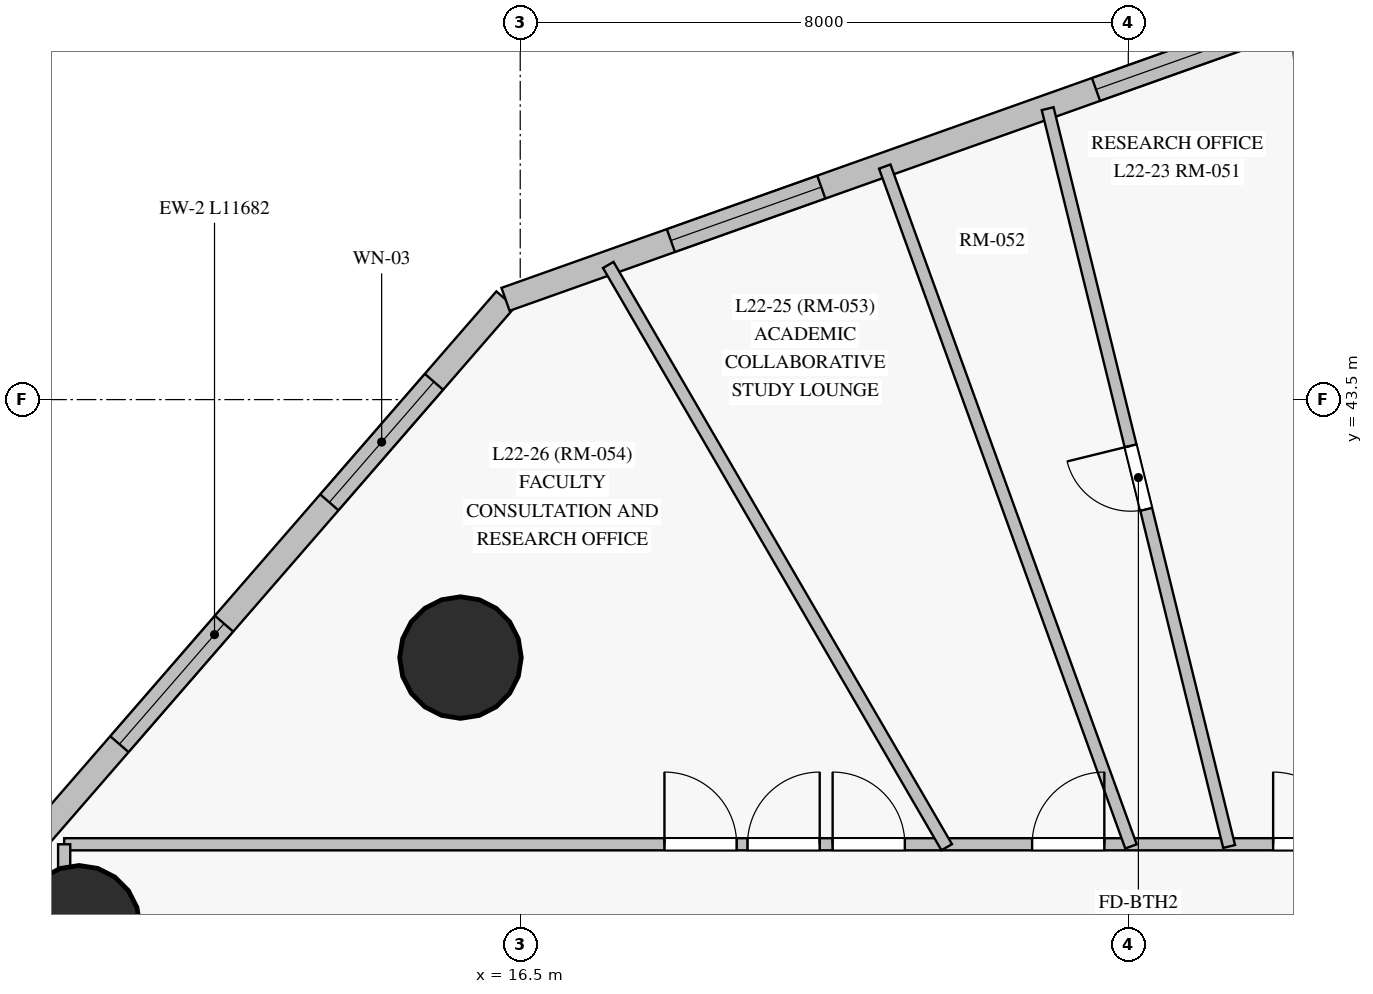
"""IFC4 building model, lengths in metres.
Left out: names, types, materials, properties, quantities, classifications, styles, units other than length and angle.
Written with IfcOpenShell. Run it as: python <this file> out.ifc"""

import sys

from ifc_helpers import new_model, si_unit, direction, frame, frame_2d, origin, origin_with_axes, origin_2d, place, context, subcontext, project, spatial, rectangle, circle, extrude, source, transform, mapped, element, fill, save


model = new_model("IFC4")
c1 = context("Model", 3, precision=1e-05, world=origin(), true_north=direction((0.0, 1.0)))
c2 = subcontext(c1, "Body", "Model", "MODEL_VIEW")
j1 = project(units=[si_unit("LENGTHUNIT", "METRE"), si_unit("PLANEANGLEUNIT", "RADIAN")], contexts=[c1])
p1 = place(None, origin())
s1 = spatial("IfcSite", under=j1, at=p1, CompositionType="ELEMENT")
p2 = place(p1, origin())
s2 = spatial("IfcBuilding", under=s1, at=p2, CompositionType="ELEMENT")
p3 = place(p2, frame((0.0, 0.0, 84.1)))
s3 = spatial("IfcBuildingStorey", under=s2, at=p3, CompositionType="ELEMENT", Elevation=84.1)
m1 = source(origin_with_axes(), c2, "Body", "SweptSolid", [
    extrude(circle(Radius=0.8, at=origin_2d()), origin(), (0.0, 0.0, 1.0), 3.6),
])
for number, where, z_axis, x_axis in (
    (1, (15.714, 40.106, 0.0), (0.0, 0.0, 1.0), (1.0, 0.0, 0.0)),
    (2, (10.697, 36.571, 0.0), (0.0, 0.0, 1.0), (1.0, 0.0, 0.0)),
):
    element("IfcColumn", number, at=place(p3, frame(where, z_axis=z_axis, x_axis=x_axis)), inside=s3, PredefinedType="COLUMN", context=c2, shape_type="MappedRepresentation", body=[
        mapped(m1, transform((0.0, 0.0, 0.0), scale=1.0)),
    ])
p4 = place(p3, frame((16.307, 44.819, 0.0), z_axis=(0.0, 0.0, 1.0), x_axis=(-0.655537404489, -0.755162705194, 0.0)))
e3 = element("IfcWall", 3, at=p4, inside=s3, PredefinedType="SOLIDWALL", context=c2, shape_type="SweptSolid", body=[
    extrude(rectangle(XDim=11.682, YDim=0.32, at=frame_2d((5.841, 0.0))), origin(), (0.0, 0.0, 1.0), 3.325),
])
p5 = place(p4, frame((1.437, 0.0, 0.85)))
e4 = element("IfcOpeningElement", 4, at=p5, cuts=e3, PredefinedType="OPENING", context=c2, shape_type="SweptSolid", body=[
    extrude(rectangle(XDim=2.1, YDim=1.95, at=frame_2d((1.05, 0.975))), frame((0.0, 0.17, 0.0), z_axis=(0.0, -1.0, 0.0), x_axis=(1.0, 0.0, 0.0)), (0.0, 0.0, 1.0), 0.34),
])
p6 = place(p4, frame((5.65, 0.0, 0.85)))
e5 = element("IfcOpeningElement", 5, at=p6, cuts=e3, PredefinedType="OPENING", context=c2, shape_type="SweptSolid", body=[
    extrude(rectangle(XDim=2.1, YDim=1.95, at=frame_2d((1.05, 0.975))), frame((0.0, 0.17, 0.0), z_axis=(0.0, -1.0, 0.0), x_axis=(1.0, 0.0, 0.0)), (0.0, 0.0, 1.0), 0.34),
])
p7 = place(p3, frame((30.027, 49.696, 0.0), z_axis=(0.0, 0.0, 1.0), x_axis=(-0.942240443112, -0.334937228991, 0.0)))
e6 = element("IfcWall", 6, at=p7, inside=s3, PredefinedType="SOLIDWALL", context=c2, shape_type="SweptSolid", body=[
    extrude(rectangle(XDim=14.562, YDim=0.32, at=frame_2d((7.281, 0.0))), origin(), (0.0, 0.0, 1.0), 3.325),
])
p8 = place(p7, frame((0.745, 0.0, 0.85)))
e7 = element("IfcOpeningElement", 7, at=p8, cuts=e6, PredefinedType="OPENING", context=c2, shape_type="SweptSolid", body=[
    extrude(rectangle(XDim=2.1, YDim=1.95, at=frame_2d((1.05, 0.975))), frame((0.0, 0.17, 0.0), z_axis=(0.0, -1.0, 0.0), x_axis=(1.0, 0.0, 0.0)), (0.0, 0.0, 1.0), 0.34),
])
p9 = place(p7, frame((4.217, 0.0, 0.85)))
e8 = element("IfcOpeningElement", 8, at=p9, cuts=e6, PredefinedType="OPENING", context=c2, shape_type="SweptSolid", body=[
    extrude(rectangle(XDim=2.1, YDim=1.95, at=frame_2d((1.05, 0.975))), frame((0.0, 0.17, 0.0), z_axis=(0.0, -1.0, 0.0), x_axis=(1.0, 0.0, 0.0)), (0.0, 0.0, 1.0), 0.34),
])
p10 = place(p7, frame((10.153, 0.0, 0.85)))
e9 = element("IfcOpeningElement", 9, at=p10, cuts=e6, PredefinedType="OPENING", context=c2, shape_type="SweptSolid", body=[
    extrude(rectangle(XDim=2.1, YDim=1.95, at=frame_2d((1.05, 0.975))), frame((0.0, 0.17, 0.0), z_axis=(0.0, -1.0, 0.0), x_axis=(1.0, 0.0, 0.0)), (0.0, 0.0, 1.0), 0.34),
])
p11 = place(p3, frame((10.5, 37.65, 0.0), z_axis=(0.0, 0.0, 1.0), x_axis=(1.0, 0.0, 0.0)))
e10 = element("IfcWall", 10, at=p11, inside=s3, PredefinedType="PARTITIONING", context=c2, shape_type="SweptSolid", body=[
    extrude(rectangle(XDim=29.75, YDim=0.16, at=frame_2d((14.875, 0.0))), origin(), (0.0, 0.0, 1.0), 2.725),
])
p12 = place(p11, frame((27.918, 0.0, 0.0)))
e11 = element("IfcOpeningElement", 11, at=p12, cuts=e10, PredefinedType="OPENING", context=c2, shape_type="SweptSolid", body=[
    extrude(rectangle(XDim=0.95, YDim=2.15, at=frame_2d((0.475, 1.075))), frame((0.0, 0.09, 0.0), z_axis=(0.0, -1.0, 0.0), x_axis=(1.0, 0.0, 0.0)), (0.0, 0.0, 1.0), 0.18),
])
p13 = place(p11, frame((25.129, 0.0, 0.0)))
e12 = element("IfcOpeningElement", 12, at=p13, cuts=e10, PredefinedType="OPENING", context=c2, shape_type="SweptSolid", body=[
    extrude(rectangle(XDim=0.95, YDim=2.15, at=frame_2d((0.475, 1.075))), frame((0.0, 0.09, 0.0), z_axis=(0.0, -1.0, 0.0), x_axis=(1.0, 0.0, 0.0)), (0.0, 0.0, 1.0), 0.18),
])
p14 = place(p11, frame((21.748, 0.0, 0.0)))
e13 = element("IfcOpeningElement", 13, at=p14, cuts=e10, PredefinedType="OPENING", context=c2, shape_type="SweptSolid", body=[
    extrude(rectangle(XDim=0.86, YDim=2.1, at=frame_2d((0.43, 1.05))), frame((0.0, 0.09, 0.0), z_axis=(0.0, -1.0, 0.0), x_axis=(1.0, 0.0, 0.0)), (0.0, 0.0, 1.0), 0.18),
])
p15 = place(p11, frame((20.048, 0.0, 0.0)))
e14 = element("IfcOpeningElement", 14, at=p15, cuts=e10, PredefinedType="OPENING", context=c2, shape_type="SweptSolid", body=[
    extrude(rectangle(XDim=0.95, YDim=2.15, at=frame_2d((0.475, 1.075))), frame((0.0, 0.09, 0.0), z_axis=(0.0, -1.0, 0.0), x_axis=(1.0, 0.0, 0.0)), (0.0, 0.0, 1.0), 0.18),
])
p16 = place(p11, frame((17.722, 0.0, 0.0)))
e15 = element("IfcOpeningElement", 15, at=p16, cuts=e10, PredefinedType="OPENING", context=c2, shape_type="SweptSolid", body=[
    extrude(rectangle(XDim=0.95, YDim=2.15, at=frame_2d((0.475, 1.075))), frame((0.0, 0.09, 0.0), z_axis=(0.0, -1.0, 0.0), x_axis=(1.0, 0.0, 0.0)), (0.0, 0.0, 1.0), 0.18),
])
p17 = place(p11, frame((15.906, 0.0, 0.0)))
e16 = element("IfcOpeningElement", 16, at=p17, cuts=e10, PredefinedType="OPENING", context=c2, shape_type="SweptSolid", body=[
    extrude(rectangle(XDim=0.95, YDim=2.15, at=frame_2d((0.475, 1.075))), frame((0.0, 0.09, 0.0), z_axis=(0.0, -1.0, 0.0), x_axis=(1.0, 0.0, 0.0)), (0.0, 0.0, 1.0), 0.18),
])
p18 = place(p11, frame((12.735, 0.0, 0.0)))
e17 = element("IfcOpeningElement", 17, at=p18, cuts=e10, PredefinedType="OPENING", context=c2, shape_type="SweptSolid", body=[
    extrude(rectangle(XDim=0.95, YDim=2.15, at=frame_2d((0.475, 1.075))), frame((0.0, 0.09, 0.0), z_axis=(0.0, -1.0, 0.0), x_axis=(1.0, 0.0, 0.0)), (0.0, 0.0, 1.0), 0.18),
])
p19 = place(p11, frame((10.11, 0.0, 0.0)))
e18 = element("IfcOpeningElement", 18, at=p19, cuts=e10, PredefinedType="OPENING", context=c2, shape_type="SweptSolid", body=[
    extrude(rectangle(XDim=0.95, YDim=2.15, at=frame_2d((0.475, 1.075))), frame((0.0, 0.09, 0.0), z_axis=(0.0, -1.0, 0.0), x_axis=(1.0, 0.0, 0.0)), (0.0, 0.0, 1.0), 0.18),
])
p20 = place(p11, frame((8.99, 0.0, 0.0)))
e19 = element("IfcOpeningElement", 19, at=p20, cuts=e10, PredefinedType="OPENING", context=c2, shape_type="SweptSolid", body=[
    extrude(rectangle(XDim=0.95, YDim=2.15, at=frame_2d((0.475, 1.075))), frame((0.0, 0.09, 0.0), z_axis=(0.0, -1.0, 0.0), x_axis=(1.0, 0.0, 0.0)), (0.0, 0.0, 1.0), 0.18),
])
p21 = place(p11, frame((7.897, 0.0, 0.0)))
e20 = element("IfcOpeningElement", 20, at=p21, cuts=e10, PredefinedType="OPENING", context=c2, shape_type="SweptSolid", body=[
    extrude(rectangle(XDim=0.95, YDim=2.15, at=frame_2d((0.475, 1.075))), frame((0.0, 0.09, 0.0), z_axis=(0.0, -1.0, 0.0), x_axis=(1.0, 0.0, 0.0)), (0.0, 0.0, 1.0), 0.18),
])
p22 = place(p3, frame((10.5, 15.35, 0.0), z_axis=(0.0, 0.0, 1.0), x_axis=(0.0, 1.0, 0.0)))
e21 = element("IfcWall", 21, at=p22, inside=s3, PredefinedType="PARTITIONING", context=c2, shape_type="SweptSolid", body=[
    extrude(rectangle(XDim=22.3, YDim=0.16, at=frame_2d((11.15, 0.0))), origin(), (0.0, 0.0, 1.0), 2.725),
])
p23 = place(p22, frame((7.33, 0.0, 0.0)))
e22 = element("IfcOpeningElement", 22, at=p23, cuts=e21, PredefinedType="OPENING", context=c2, shape_type="SweptSolid", body=[
    extrude(rectangle(XDim=0.95, YDim=2.15, at=frame_2d((0.475, 1.075))), frame((0.0, 0.09, 0.0), z_axis=(0.0, -1.0, 0.0), x_axis=(1.0, 0.0, 0.0)), (0.0, 0.0, 1.0), 0.18),
])
p24 = place(p22, frame((11.015, 0.0, 0.0)))
e23 = element("IfcOpeningElement", 23, at=p24, cuts=e21, PredefinedType="OPENING", context=c2, shape_type="SweptSolid", body=[
    extrude(rectangle(XDim=0.95, YDim=2.15, at=frame_2d((0.475, 1.075))), frame((0.0, 0.09, 0.0), z_axis=(0.0, -1.0, 0.0), x_axis=(1.0, 0.0, 0.0)), (0.0, 0.0, 1.0), 0.18),
])
p25 = place(p3, frame((25.826, 37.621, 0.0), z_axis=(0.0, 0.0, 1.0), x_axis=(-0.238844378247, 0.971057857689, 0.0)))
e24 = element("IfcWall", 24, at=p25, inside=s3, PredefinedType="PARTITIONING", context=c2, shape_type="SweptSolid", body=[
    extrude(rectangle(XDim=9.996, YDim=0.16, at=frame_2d((4.998, 0.0))), origin(), (0.0, 0.0, 1.0), 3.325),
])
p26 = place(p25, frame((4.568, 0.0, 0.0)))
e25 = element("IfcOpeningElement", 25, at=p26, cuts=e24, PredefinedType="OPENING", context=c2, shape_type="SweptSolid", body=[
    extrude(rectangle(XDim=0.86, YDim=2.04, at=frame_2d((0.43, 1.02))), frame((0.0, 0.09, 0.0), z_axis=(0.0, -1.0, 0.0), x_axis=(1.0, 0.0, 0.0)), (0.0, 0.0, 1.0), 0.18),
])
p27 = place(p3, frame((24.535, 37.622, 0.0), z_axis=(0.0, 0.0, 1.0), x_axis=(-0.340568222743, 0.940219807097, 0.0)))
e26 = element("IfcWall", 26, at=p27, inside=s3, PredefinedType="PARTITIONING", context=c2, shape_type="SweptSolid", body=[
    extrude(rectangle(XDim=9.513, YDim=0.16, at=frame_2d((4.756, 0.0))), origin(), (0.0, 0.0, 1.0), 3.325),
])
p28 = place(p3, frame((22.111, 37.611, 0.0), z_axis=(0.0, 0.0, 1.0), x_axis=(-0.502517011977, 0.864567321077, 0.0)))
e27 = element("IfcWall", 27, at=p28, inside=s3, PredefinedType="PARTITIONING", context=c2, shape_type="SweptSolid", body=[
    extrude(rectangle(XDim=8.861, YDim=0.16, at=frame_2d((4.43, 0.0))), origin(), (0.0, 0.0, 1.0), 3.325),
])
p29 = place(p3, frame((26.841, 47.036, 0.0), z_axis=(0.0, 0.0, 1.0), x_axis=(-0.083405123378, 0.996515722603, 0.0)))
e28 = element("IfcWall", 28, at=p29, inside=s3, PredefinedType="PARTITIONING", context=c2, shape_type="SweptSolid", body=[
    extrude(rectangle(XDim=1.461, YDim=0.16, at=frame_2d((0.73, 0.0))), origin(), (0.0, 0.0, 1.0), 3.325),
])
m2 = source(origin_with_axes(), c2, "Body", "SweptSolid", [
    extrude(rectangle(XDim=2.1, YDim=1.95, at=frame_2d((1.05, 0.975))), frame((0.0, 0.03, 0.0), z_axis=(0.0, -1.0, 0.0), x_axis=(1.0, 0.0, 0.0)), (0.0, 0.0, 1.0), 0.06),
])
p30 = place(p5, origin())
e29 = element("IfcWindow", 29, at=p30, inside=s3, PartitioningType="SINGLE_PANEL", PredefinedType="WINDOW", context=c2, shape_type="MappedRepresentation", body=[
    mapped(m2, transform((0.0, 0.0, 0.0), scale=1.0)),
])
fill(e4, e29)
p31 = place(p6, origin())
e30 = element("IfcWindow", 30, at=p31, inside=s3, PartitioningType="SINGLE_PANEL", PredefinedType="WINDOW", context=c2, shape_type="MappedRepresentation", body=[
    mapped(m2, transform((0.0, 0.0, 0.0), scale=1.0)),
])
fill(e5, e30)
p32 = place(p9, origin())
e31 = element("IfcWindow", 31, at=p32, inside=s3, PartitioningType="SINGLE_PANEL", PredefinedType="WINDOW", context=c2, shape_type="MappedRepresentation", body=[
    mapped(m2, transform((0.0, 0.0, 0.0), scale=1.0)),
])
fill(e8, e31)
p33 = place(p10, origin())
e32 = element("IfcWindow", 32, at=p33, inside=s3, PartitioningType="SINGLE_PANEL", PredefinedType="WINDOW", context=c2, shape_type="MappedRepresentation", body=[
    mapped(m2, transform((0.0, 0.0, 0.0), scale=1.0)),
])
fill(e9, e32)
m3 = source(origin_with_axes(), c2, "Body", "SweptSolid", [
    extrude(rectangle(XDim=0.95, YDim=2.15, at=frame_2d((0.475, 1.075))), frame((0.0, 0.025, 0.0), z_axis=(0.0, -1.0, 0.0), x_axis=(1.0, 0.0, 0.0)), (0.0, 0.0, 1.0), 0.05),
])
p34 = place(p17, origin())
e33 = element("IfcDoor", 33, at=p34, inside=s3, OperationType="SINGLE_SWING_LEFT", PredefinedType="DOOR", context=c2, shape_type="MappedRepresentation", body=[
    mapped(m3, transform((0.0, 0.0, 0.0), scale=1.0)),
])
fill(e16, e33)
p35 = place(p18, origin())
e34 = element("IfcDoor", 34, at=p35, inside=s3, OperationType="SINGLE_SWING_RIGHT", PredefinedType="DOOR", context=c2, shape_type="MappedRepresentation", body=[
    mapped(m3, transform((0.0, 0.0, 0.0), scale=1.0)),
])
fill(e17, e34)
p36 = place(p19, origin())
e35 = element("IfcDoor", 35, at=p36, inside=s3, OperationType="SINGLE_SWING_LEFT", PredefinedType="DOOR", context=c2, shape_type="MappedRepresentation", body=[
    mapped(m3, transform((0.0, 0.0, 0.0), scale=1.0)),
])
fill(e18, e35)
p37 = place(p20, origin())
e36 = element("IfcDoor", 36, at=p37, inside=s3, OperationType="SINGLE_SWING_RIGHT", PredefinedType="DOOR", context=c2, shape_type="MappedRepresentation", body=[
    mapped(m3, transform((0.0, 0.0, 0.0), scale=1.0)),
])
fill(e19, e36)
p38 = place(p21, origin())
e37 = element("IfcDoor", 37, at=p38, inside=s3, OperationType="SINGLE_SWING_LEFT", PredefinedType="DOOR", context=c2, shape_type="MappedRepresentation", body=[
    mapped(m3, transform((0.0, 0.0, 0.0), scale=1.0)),
])
fill(e20, e37)
m4 = source(origin_with_axes(), c2, "Body", "SweptSolid", [
    extrude(rectangle(XDim=0.86, YDim=2.04, at=frame_2d((0.43, 1.02))), frame((0.0, 0.025, 0.0), z_axis=(0.0, -1.0, 0.0), x_axis=(1.0, 0.0, 0.0)), (0.0, 0.0, 1.0), 0.05),
])
p39 = place(p26, origin())
e38 = element("IfcDoor", 38, at=p39, inside=s3, OperationType="SINGLE_SWING_RIGHT", PredefinedType="DOOR", context=c2, shape_type="MappedRepresentation", body=[
    mapped(m4, transform((0.0, 0.0, 0.0), scale=1.0)),
])
fill(e25, e38)
save(model, sys.argv[1])
